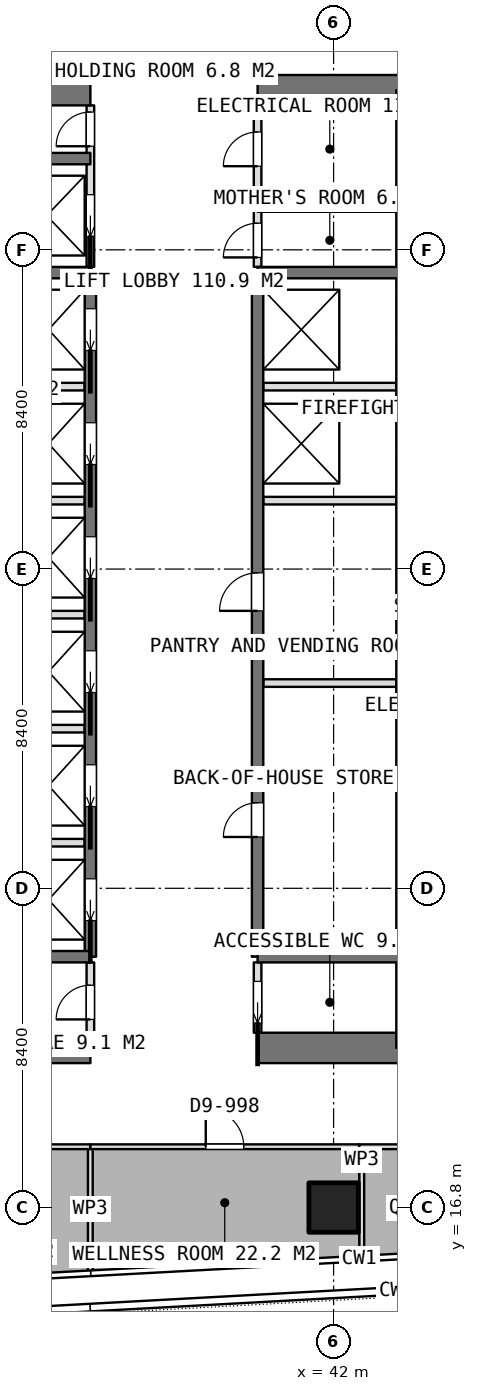
"""IFC4 building model, lengths in metres.
Left out: names, types, materials, properties, quantities, classifications, styles, units other than length and angle.
Written with IfcOpenShell. Run it as: python <this file> out.ifc"""

import sys

from ifc_helpers import new_model, si_unit, direction, frame, frame_2d, origin, origin_2d, place, context, subcontext, project, spatial, rectangle, extrude, element, fill, save


model = new_model("IFC4")
c1 = context("Model", 3, precision=1e-05, world=origin(), true_north=direction((0.0, 1.0)))
c2 = subcontext(c1, "Body", "Model", "MODEL_VIEW")
j1 = project(units=[si_unit("LENGTHUNIT", "METRE"), si_unit("PLANEANGLEUNIT", "RADIAN")], contexts=[c1])
p1 = place(None, origin())
s1 = spatial("IfcSite", under=j1, at=p1, CompositionType="ELEMENT")
p2 = place(p1, origin())
s2 = spatial("IfcBuilding", under=s1, at=p2, CompositionType="ELEMENT")
p3 = place(p2, frame((0.0, 0.0, 268.85)))
s3 = spatial("IfcBuildingStorey", under=s2, at=p3, CompositionType="ELEMENT", Elevation=268.85)
p4 = place(p3, frame((25.2, 21.0, 0.0), z_axis=(0.0, 0.0, 1.0), x_axis=(1.0, 0.0, 0.0)))
e1 = element("IfcWall", 1, at=p4, inside=s3, PredefinedType="SHEAR", context=c2, shape_type="SweptSolid", body=[
    extrude(rectangle(XDim=10.4, YDim=0.8, at=frame_2d((5.2, 0.0))), origin(), (0.0, 0.0, 1.0), 3.75),
])
p5 = place(p3, frame((40.0, 21.0, 0.0), z_axis=(0.0, 0.0, 1.0), x_axis=(1.0, 0.0, 0.0)))
e2 = element("IfcWall", 2, at=p5, inside=s3, PredefinedType="SHEAR", context=c2, shape_type="SweptSolid", body=[
    extrude(rectangle(XDim=10.4, YDim=0.8, at=frame_2d((5.2, 0.0))), origin(), (0.0, 0.0, 1.0), 3.75),
])
p6 = place(p3, frame((25.2, 46.2, 0.0), z_axis=(0.0, 0.0, 1.0), x_axis=(1.0, 0.0, 0.0)))
e3 = element("IfcWall", 3, at=p6, inside=s3, PredefinedType="SHEAR", context=c2, shape_type="SweptSolid", body=[
    extrude(rectangle(XDim=10.4, YDim=0.8, at=frame_2d((5.2, 0.0))), origin(), (0.0, 0.0, 1.0), 3.75),
])
p7 = place(p3, frame((40.0, 46.2, 0.0), z_axis=(0.0, 0.0, 1.0), x_axis=(1.0, 0.0, 0.0)))
e4 = element("IfcWall", 4, at=p7, inside=s3, PredefinedType="SHEAR", context=c2, shape_type="SweptSolid", body=[
    extrude(rectangle(XDim=10.4, YDim=0.8, at=frame_2d((5.2, 0.0))), origin(), (0.0, 0.0, 1.0), 3.75),
])
p8 = place(p3, frame((43.8, 21.0, 0.0), z_axis=(0.0, 0.0, 1.0), x_axis=(0.0, 1.0, 0.0)))
e5 = element("IfcWall", 5, at=p8, inside=s3, PredefinedType="SHEAR", context=c2, shape_type="SweptSolid", body=[
    extrude(rectangle(XDim=25.2, YDim=0.3, at=frame_2d((12.6, 0.0))), origin(), (0.0, 0.0, 1.0), 3.75),
])
p9 = place(p3, frame((35.6, 23.4, 0.0), z_axis=(0.0, 0.0, 1.0), x_axis=(0.0, 1.0, 0.0)))
e6 = element("IfcWall", 6, at=p9, inside=s3, PredefinedType="SHEAR", context=c2, shape_type="SweptSolid", body=[
    extrude(rectangle(XDim=18.0, YDim=0.3, at=frame_2d((9.0, 0.0))), origin(), (0.0, 0.0, 1.0), 3.75),
])
p10 = place(p9, frame((0.95, 0.0, 0.0)))
e7 = element("IfcOpeningElement", 7, at=p10, cuts=e6, PredefinedType="OPENING", context=c2, shape_type="SweptSolid", body=[
    extrude(rectangle(XDim=1.1, YDim=2.1, at=frame_2d((0.55, 1.05))), frame((0.0, 0.16, 0.0), z_axis=(0.0, -1.0, 0.0), x_axis=(1.0, 0.0, 0.0)), (0.0, 0.0, 1.0), 0.32),
])
p11 = place(p9, frame((3.95, 0.0, 0.0)))
e8 = element("IfcOpeningElement", 8, at=p11, cuts=e6, PredefinedType="OPENING", context=c2, shape_type="SweptSolid", body=[
    extrude(rectangle(XDim=1.1, YDim=2.1, at=frame_2d((0.55, 1.05))), frame((0.0, 0.16, 0.0), z_axis=(0.0, -1.0, 0.0), x_axis=(1.0, 0.0, 0.0)), (0.0, 0.0, 1.0), 0.32),
])
p12 = place(p9, frame((6.95, 0.0, 0.0)))
e9 = element("IfcOpeningElement", 9, at=p12, cuts=e6, PredefinedType="OPENING", context=c2, shape_type="SweptSolid", body=[
    extrude(rectangle(XDim=1.1, YDim=2.1, at=frame_2d((0.55, 1.05))), frame((0.0, 0.16, 0.0), z_axis=(0.0, -1.0, 0.0), x_axis=(1.0, 0.0, 0.0)), (0.0, 0.0, 1.0), 0.32),
])
p13 = place(p9, frame((9.95, 0.0, 0.0)))
e10 = element("IfcOpeningElement", 10, at=p13, cuts=e6, PredefinedType="OPENING", context=c2, shape_type="SweptSolid", body=[
    extrude(rectangle(XDim=1.1, YDim=2.1, at=frame_2d((0.55, 1.05))), frame((0.0, 0.16, 0.0), z_axis=(0.0, -1.0, 0.0), x_axis=(1.0, 0.0, 0.0)), (0.0, 0.0, 1.0), 0.32),
])
p14 = place(p9, frame((12.95, 0.0, 0.0)))
e11 = element("IfcOpeningElement", 11, at=p14, cuts=e6, PredefinedType="OPENING", context=c2, shape_type="SweptSolid", body=[
    extrude(rectangle(XDim=1.1, YDim=2.1, at=frame_2d((0.55, 1.05))), frame((0.0, 0.16, 0.0), z_axis=(0.0, -1.0, 0.0), x_axis=(1.0, 0.0, 0.0)), (0.0, 0.0, 1.0), 0.32),
])
p15 = place(p9, frame((15.95, 0.0, 0.0)))
e12 = element("IfcOpeningElement", 12, at=p15, cuts=e6, PredefinedType="OPENING", context=c2, shape_type="SweptSolid", body=[
    extrude(rectangle(XDim=1.1, YDim=2.1, at=frame_2d((0.55, 1.05))), frame((0.0, 0.16, 0.0), z_axis=(0.0, -1.0, 0.0), x_axis=(1.0, 0.0, 0.0)), (0.0, 0.0, 1.0), 0.32),
])
p16 = place(p3, frame((40.0, 23.4, 0.0), z_axis=(0.0, 0.0, 1.0), x_axis=(0.0, 1.0, 0.0)))
e13 = element("IfcWall", 13, at=p16, inside=s3, PredefinedType="SHEAR", context=c2, shape_type="SweptSolid", body=[
    extrude(rectangle(XDim=18.0, YDim=0.3, at=frame_2d((9.0, 0.0))), origin(), (0.0, 0.0, 1.0), 3.75),
])
p17 = place(p16, frame((3.15, 0.0, 0.0)))
e14 = element("IfcOpeningElement", 14, at=p17, cuts=e13, PredefinedType="OPENING", context=c2, shape_type="SweptSolid", body=[
    extrude(rectangle(XDim=0.9, YDim=2.1, at=frame_2d((0.45, 1.05))), frame((0.0, 0.16, 0.0), z_axis=(0.0, -1.0, 0.0), x_axis=(1.0, 0.0, 0.0)), (0.0, 0.0, 1.0), 0.32),
])
p18 = place(p16, frame((9.1, 0.0, 0.0)))
e15 = element("IfcOpeningElement", 15, at=p18, cuts=e13, PredefinedType="OPENING", context=c2, shape_type="SweptSolid", body=[
    extrude(rectangle(XDim=1.0, YDim=2.1, at=frame_2d((0.5, 1.05))), frame((0.0, 0.16, 0.0), z_axis=(0.0, -1.0, 0.0), x_axis=(1.0, 0.0, 0.0)), (0.0, 0.0, 1.0), 0.32),
])
for number, where, z_axis, x_axis in (
    (16, (31.8, 23.4, 0.0), (0.0, 0.0, 1.0), (1.0, 0.0, 0.0)),
    (17, (31.8, 41.4, 0.0), (0.0, 0.0, 1.0), (1.0, 0.0, 0.0)),
    (18, (31.8, 44.4, 0.0), (0.0, 0.0, 1.0), (1.0, 0.0, 0.0)),
    (19, (40.0, 23.4, 0.0), (0.0, 0.0, 1.0), (1.0, 0.0, 0.0)),
    (20, (40.0, 41.4, 0.0), (0.0, 0.0, 1.0), (1.0, 0.0, 0.0)),
):
    element("IfcWall", number, at=place(p3, frame(where, z_axis=z_axis, x_axis=x_axis)), inside=s3, PredefinedType="SHEAR", context=c2, shape_type="SweptSolid", body=[
        extrude(rectangle(XDim=3.8, YDim=0.3, at=frame_2d((1.9, 0.0))), origin(), (0.0, 0.0, 1.0), 3.75),
    ])
p19 = place(p3, frame((42.0, 16.8, 0.0), z_axis=(0.0, 0.0, 1.0), x_axis=(1.0, 0.0, 0.0)))
e21 = element("IfcColumn", 21, at=p19, inside=s3, PredefinedType="COLUMN", context=c2, shape_type="SweptSolid", body=[
    extrude(rectangle(XDim=1.3, YDim=1.3, at=origin_2d()), origin(), (0.0, 0.0, 1.0), 3.75),
])
for number, where, z_axis, x_axis in (
    (22, (31.95, 26.4, 0.0), (0.0, 0.0, 1.0), (1.0, 0.0, 0.0)),
    (23, (31.95, 29.4, 0.0), (0.0, 0.0, 1.0), (1.0, 0.0, 0.0)),
    (24, (31.95, 32.4, 0.0), (0.0, 0.0, 1.0), (1.0, 0.0, 0.0)),
    (25, (31.95, 35.4, 0.0), (0.0, 0.0, 1.0), (1.0, 0.0, 0.0)),
    (26, (31.95, 38.4, 0.0), (0.0, 0.0, 1.0), (1.0, 0.0, 0.0)),
    (27, (40.15, 35.4, 0.0), (0.0, 0.0, 1.0), (1.0, 0.0, 0.0)),
    (28, (40.15, 38.4, 0.0), (0.0, 0.0, 1.0), (1.0, 0.0, 0.0)),
):
    element("IfcWall", number, at=place(p3, frame(where, z_axis=z_axis, x_axis=x_axis)), inside=s3, PredefinedType="PARTITIONING", context=c2, shape_type="SweptSolid", body=[
        extrude(rectangle(XDim=3.5, YDim=0.2, at=frame_2d((1.75, 0.0))), origin(), (0.0, 0.0, 1.0), 3.5),
    ])
p20 = place(p3, frame((40.0, 21.4, 0.0), z_axis=(0.0, 0.0, 1.0), x_axis=(0.0, 1.0, 0.0)))
e29 = element("IfcWall", 29, at=p20, inside=s3, PredefinedType="PARTITIONING", context=c2, shape_type="SweptSolid", body=[
    extrude(rectangle(XDim=1.85, YDim=0.2, at=frame_2d((0.925, 0.0))), origin(), (0.0, 0.0, 1.0), 3.5),
])
p21 = place(p20, frame((0.25, 0.0, 0.0)))
e30 = element("IfcOpeningElement", 30, at=p21, cuts=e29, PredefinedType="OPENING", context=c2, shape_type="SweptSolid", body=[
    extrude(rectangle(XDim=1.1, YDim=2.1, at=frame_2d((0.55, 1.05))), frame((0.0, 0.11, 0.0), z_axis=(0.0, -1.0, 0.0), x_axis=(1.0, 0.0, 0.0)), (0.0, 0.0, 1.0), 0.22),
])
p22 = place(p3, frame((40.0, 41.55, 0.0), z_axis=(0.0, 0.0, 1.0), x_axis=(0.0, 1.0, 0.0)))
e31 = element("IfcWall", 31, at=p22, inside=s3, PredefinedType="PARTITIONING", context=c2, shape_type="SweptSolid", body=[
    extrude(rectangle(XDim=4.25, YDim=0.2, at=frame_2d((2.125, 0.0))), origin(), (0.0, 0.0, 1.0), 3.5),
])
p23 = place(p22, frame((2.65, 0.0, 0.0)))
e32 = element("IfcOpeningElement", 32, at=p23, cuts=e31, PredefinedType="OPENING", context=c2, shape_type="SweptSolid", body=[
    extrude(rectangle(XDim=0.9, YDim=2.1, at=frame_2d((0.45, 1.05))), frame((0.0, 0.11, 0.0), z_axis=(0.0, -1.0, 0.0), x_axis=(1.0, 0.0, 0.0)), (0.0, 0.0, 1.0), 0.22),
])
p24 = place(p22, frame((0.25, 0.0, 0.0)))
e33 = element("IfcOpeningElement", 33, at=p24, cuts=e31, PredefinedType="OPENING", context=c2, shape_type="SweptSolid", body=[
    extrude(rectangle(XDim=0.9, YDim=2.1, at=frame_2d((0.45, 1.05))), frame((0.0, 0.11, 0.0), z_axis=(0.0, -1.0, 0.0), x_axis=(1.0, 0.0, 0.0)), (0.0, 0.0, 1.0), 0.22),
])
p25 = place(p3, frame((35.6, 41.55, 0.0), z_axis=(0.0, 0.0, 1.0), x_axis=(0.0, 1.0, 0.0)))
e34 = element("IfcWall", 34, at=p25, inside=s3, PredefinedType="PARTITIONING", context=c2, shape_type="SweptSolid", body=[
    extrude(rectangle(XDim=4.25, YDim=0.2, at=frame_2d((2.125, 0.0))), origin(), (0.0, 0.0, 1.0), 3.5),
])
p26 = place(p25, frame((3.175, 0.0, 0.0)))
e35 = element("IfcOpeningElement", 35, at=p26, cuts=e34, PredefinedType="OPENING", context=c2, shape_type="SweptSolid", body=[
    extrude(rectangle(XDim=0.9, YDim=2.1, at=frame_2d((0.45, 1.05))), frame((0.0, 0.11, 0.0), z_axis=(0.0, -1.0, 0.0), x_axis=(1.0, 0.0, 0.0)), (0.0, 0.0, 1.0), 0.22),
])
p27 = place(p25, frame((0.8, 0.0, 0.0)))
e36 = element("IfcOpeningElement", 36, at=p27, cuts=e34, PredefinedType="OPENING", context=c2, shape_type="SweptSolid", body=[
    extrude(rectangle(XDim=1.1, YDim=2.1, at=frame_2d((0.55, 1.05))), frame((0.0, 0.11, 0.0), z_axis=(0.0, -1.0, 0.0), x_axis=(1.0, 0.0, 0.0)), (0.0, 0.0, 1.0), 0.22),
])
p28 = place(p3, frame((35.6, 21.4, 0.0), z_axis=(0.0, 0.0, 1.0), x_axis=(0.0, 1.0, 0.0)))
e37 = element("IfcWall", 37, at=p28, inside=s3, PredefinedType="PARTITIONING", context=c2, shape_type="SweptSolid", body=[
    extrude(rectangle(XDim=1.85, YDim=0.2, at=frame_2d((0.925, 0.0))), origin(), (0.0, 0.0, 1.0), 3.5),
])
p29 = place(p28, frame((0.35, 0.0, 0.0)))
e38 = element("IfcOpeningElement", 38, at=p29, cuts=e37, PredefinedType="OPENING", context=c2, shape_type="SweptSolid", body=[
    extrude(rectangle(XDim=0.9, YDim=2.1, at=frame_2d((0.45, 1.05))), frame((0.0, 0.11, 0.0), z_axis=(0.0, -1.0, 0.0), x_axis=(1.0, 0.0, 0.0)), (0.0, 0.0, 1.0), 0.22),
])
p30 = place(p3, frame((40.15, 30.6, 0.0), z_axis=(0.0, 0.0, 1.0), x_axis=(1.0, 0.0, 0.0)))
e39 = element("IfcWall", 39, at=p30, inside=s3, PredefinedType="PARTITIONING", context=c2, shape_type="SweptSolid", body=[
    extrude(rectangle(XDim=3.5, YDim=0.2, at=frame_2d((1.75, 0.0))), origin(), (0.0, 0.0, 1.0), 3.5),
])
p31 = place(p3, frame((40.0, 43.1, 0.0), z_axis=(0.0, 0.0, 1.0), x_axis=(1.0, 0.0, 0.0)))
e40 = element("IfcWall", 40, at=p31, inside=s3, PredefinedType="PARTITIONING", context=c2, shape_type="SweptSolid", body=[
    extrude(rectangle(XDim=3.65, YDim=0.2, at=frame_2d((1.825, 0.0))), origin(), (0.0, 0.0, 1.0), 3.5),
])
p32 = place(p3, frame((35.599, 15.119, 0.0), z_axis=(0.0, 0.0, 1.0), x_axis=(0.0, 1.0, 0.0)))
e41 = element("IfcWall", 41, at=p32, inside=s3, PredefinedType="PARTITIONING", context=c2, shape_type="SweptSolid", body=[
    extrude(rectangle(XDim=3.281, YDim=0.125, at=frame_2d((1.641, 0.0))), origin(), (0.0, 0.0, 1.0), 3.5),
])
p33 = place(p3, frame((35.599, 18.4, 0.0), z_axis=(0.0, 0.0, 1.0), x_axis=(1.0, 0.0, 0.0)))
e42 = element("IfcWall", 42, at=p33, inside=s3, PredefinedType="PARTITIONING", context=c2, shape_type="SweptSolid", body=[
    extrude(rectangle(XDim=7.074, YDim=0.125, at=frame_2d((3.537, 0.0))), origin(), (0.0, 0.0, 1.0), 3.5),
])
p34 = place(p33, frame((3.037, 0.0, 0.0)))
e43 = element("IfcOpeningElement", 43, at=p34, cuts=e42, PredefinedType="OPENING", context=c2, shape_type="SweptSolid", body=[
    extrude(rectangle(XDim=1.0, YDim=2.1, at=frame_2d((0.5, 1.05))), frame((0.0, 0.073, 0.0), z_axis=(0.0, -1.0, 0.0), x_axis=(1.0, 0.0, 0.0)), (0.0, 0.0, 1.0), 0.145),
])
p35 = place(p3, frame((42.742, 18.337, 0.0), z_axis=(0.0, 0.0, 1.0), x_axis=(0.0, -1.0, 0.0)))
e44 = element("IfcWall", 44, at=p35, inside=s3, PredefinedType="PARTITIONING", context=c2, shape_type="SweptSolid", body=[
    extrude(rectangle(XDim=2.799, YDim=0.125, at=frame_2d((1.399, 0.0))), origin(), (0.0, 0.0, 1.0), 3.5),
])
p36 = place(p3, frame((42.674, 18.4, 0.0), z_axis=(0.0, 0.0, 1.0), x_axis=(1.0, 0.0, 0.0)))
e45 = element("IfcWall", 45, at=p36, inside=s3, PredefinedType="PARTITIONING", context=c2, shape_type="SweptSolid", body=[
    extrude(rectangle(XDim=7.726, YDim=0.125, at=frame_2d((3.863, 0.0))), origin(), (0.0, 0.0, 1.0), 3.5),
])
p37 = place(p36, frame((3.363, 0.0, 0.0)))
e46 = element("IfcOpeningElement", 46, at=p37, cuts=e45, PredefinedType="OPENING", context=c2, shape_type="SweptSolid", body=[
    extrude(rectangle(XDim=1.0, YDim=2.1, at=frame_2d((0.5, 1.05))), frame((0.0, 0.073, 0.0), z_axis=(0.0, -1.0, 0.0), x_axis=(1.0, 0.0, 0.0)), (0.0, 0.0, 1.0), 0.145),
])
p38 = place(p3, frame((27.255, 18.4, 0.0), z_axis=(0.0, 0.0, 1.0), x_axis=(1.0, 0.0, 0.0)))
e47 = element("IfcWall", 47, at=p38, inside=s3, PredefinedType="PARTITIONING", context=c2, shape_type="SweptSolid", body=[
    extrude(rectangle(XDim=8.343, YDim=0.125, at=frame_2d((4.171, 0.0))), origin(), (0.0, 0.0, 1.0), 3.5),
])
p39 = place(p38, frame((3.671, 0.0, 0.0)))
e48 = element("IfcOpeningElement", 48, at=p39, cuts=e47, PredefinedType="OPENING", context=c2, shape_type="SweptSolid", body=[
    extrude(rectangle(XDim=1.0, YDim=2.1, at=frame_2d((0.5, 1.05))), frame((0.0, 0.073, 0.0), z_axis=(0.0, -1.0, 0.0), x_axis=(1.0, 0.0, 0.0)), (0.0, 0.0, 1.0), 0.145),
])
p40 = place(p21, origin())
e49 = element("IfcDoor", 49, at=p40, inside=s3, OperationType="SLIDING_TO_LEFT", PredefinedType="DOOR", context=c2, shape_type="SweptSolid", body=[
    extrude(rectangle(XDim=1.1, YDim=2.1, at=frame_2d((0.55, 1.05))), frame((0.0, 0.025, 0.0), z_axis=(0.0, -1.0, 0.0), x_axis=(1.0, 0.0, 0.0)), (0.0, 0.0, 1.0), 0.05),
])
fill(e30, e49)
p41 = place(p29, origin())
e50 = element("IfcDoor", 50, at=p41, inside=s3, OperationType="SINGLE_SWING_LEFT", PredefinedType="DOOR", context=c2, shape_type="SweptSolid", body=[
    extrude(rectangle(XDim=0.9, YDim=2.1, at=frame_2d((0.45, 1.05))), frame((0.0, 0.025, 0.0), z_axis=(0.0, -1.0, 0.0), x_axis=(1.0, 0.0, 0.0)), (0.0, 0.0, 1.0), 0.05),
])
fill(e38, e50)
p42 = place(p23, origin())
e51 = element("IfcDoor", 51, at=p42, inside=s3, OperationType="SINGLE_SWING_LEFT", PredefinedType="DOOR", context=c2, shape_type="SweptSolid", body=[
    extrude(rectangle(XDim=0.9, YDim=2.1, at=frame_2d((0.45, 1.05))), frame((0.0, 0.025, 0.0), z_axis=(0.0, -1.0, 0.0), x_axis=(1.0, 0.0, 0.0)), (0.0, 0.0, 1.0), 0.05),
])
fill(e32, e51)
p43 = place(p24, origin())
e52 = element("IfcDoor", 52, at=p43, inside=s3, OperationType="SINGLE_SWING_LEFT", PredefinedType="DOOR", context=c2, shape_type="SweptSolid", body=[
    extrude(rectangle(XDim=0.9, YDim=2.1, at=frame_2d((0.45, 1.05))), frame((0.0, 0.025, 0.0), z_axis=(0.0, -1.0, 0.0), x_axis=(1.0, 0.0, 0.0)), (0.0, 0.0, 1.0), 0.05),
])
fill(e33, e52)
p44 = place(p17, origin())
e53 = element("IfcDoor", 53, at=p44, inside=s3, OperationType="SINGLE_SWING_LEFT", PredefinedType="DOOR", context=c2, shape_type="SweptSolid", body=[
    extrude(rectangle(XDim=0.9, YDim=2.1, at=frame_2d((0.45, 1.05))), frame((0.0, 0.025, 0.0), z_axis=(0.0, -1.0, 0.0), x_axis=(1.0, 0.0, 0.0)), (0.0, 0.0, 1.0), 0.05),
])
fill(e14, e53)
p45 = place(p18, origin())
e54 = element("IfcDoor", 54, at=p45, inside=s3, OperationType="SINGLE_SWING_LEFT", PredefinedType="DOOR", context=c2, shape_type="SweptSolid", body=[
    extrude(rectangle(XDim=1.0, YDim=2.1, at=frame_2d((0.5, 1.05))), frame((0.0, 0.025, 0.0), z_axis=(0.0, -1.0, 0.0), x_axis=(1.0, 0.0, 0.0)), (0.0, 0.0, 1.0), 0.05),
])
fill(e15, e54)
p46 = place(p26, origin())
e55 = element("IfcDoor", 55, at=p46, inside=s3, OperationType="SINGLE_SWING_LEFT", PredefinedType="DOOR", context=c2, shape_type="SweptSolid", body=[
    extrude(rectangle(XDim=0.9, YDim=2.1, at=frame_2d((0.45, 1.05))), frame((0.0, 0.025, 0.0), z_axis=(0.0, -1.0, 0.0), x_axis=(1.0, 0.0, 0.0)), (0.0, 0.0, 1.0), 0.05),
])
fill(e35, e55)
p47 = place(p10, origin())
e56 = element("IfcDoor", 56, at=p47, inside=s3, OperationType="SLIDING_TO_LEFT", PredefinedType="USERDEFINED", context=c2, shape_type="SweptSolid", body=[
    extrude(rectangle(XDim=1.1, YDim=2.1, at=frame_2d((0.55, 1.05))), frame((0.0, 0.025, 0.0), z_axis=(0.0, -1.0, 0.0), x_axis=(1.0, 0.0, 0.0)), (0.0, 0.0, 1.0), 0.05),
])
fill(e7, e56)
p48 = place(p11, origin())
e57 = element("IfcDoor", 57, at=p48, inside=s3, OperationType="SLIDING_TO_LEFT", PredefinedType="USERDEFINED", context=c2, shape_type="SweptSolid", body=[
    extrude(rectangle(XDim=1.1, YDim=2.1, at=frame_2d((0.55, 1.05))), frame((0.0, 0.025, 0.0), z_axis=(0.0, -1.0, 0.0), x_axis=(1.0, 0.0, 0.0)), (0.0, 0.0, 1.0), 0.05),
])
fill(e8, e57)
p49 = place(p12, origin())
e58 = element("IfcDoor", 58, at=p49, inside=s3, OperationType="SLIDING_TO_LEFT", PredefinedType="USERDEFINED", context=c2, shape_type="SweptSolid", body=[
    extrude(rectangle(XDim=1.1, YDim=2.1, at=frame_2d((0.55, 1.05))), frame((0.0, 0.025, 0.0), z_axis=(0.0, -1.0, 0.0), x_axis=(1.0, 0.0, 0.0)), (0.0, 0.0, 1.0), 0.05),
])
fill(e9, e58)
p50 = place(p13, origin())
e59 = element("IfcDoor", 59, at=p50, inside=s3, OperationType="SLIDING_TO_LEFT", PredefinedType="USERDEFINED", context=c2, shape_type="SweptSolid", body=[
    extrude(rectangle(XDim=1.1, YDim=2.1, at=frame_2d((0.55, 1.05))), frame((0.0, 0.025, 0.0), z_axis=(0.0, -1.0, 0.0), x_axis=(1.0, 0.0, 0.0)), (0.0, 0.0, 1.0), 0.05),
])
fill(e10, e59)
p51 = place(p14, origin())
e60 = element("IfcDoor", 60, at=p51, inside=s3, OperationType="SLIDING_TO_LEFT", PredefinedType="USERDEFINED", context=c2, shape_type="SweptSolid", body=[
    extrude(rectangle(XDim=1.1, YDim=2.1, at=frame_2d((0.55, 1.05))), frame((0.0, 0.025, 0.0), z_axis=(0.0, -1.0, 0.0), x_axis=(1.0, 0.0, 0.0)), (0.0, 0.0, 1.0), 0.05),
])
fill(e11, e60)
p52 = place(p15, origin())
e61 = element("IfcDoor", 61, at=p52, inside=s3, OperationType="SLIDING_TO_LEFT", PredefinedType="USERDEFINED", context=c2, shape_type="SweptSolid", body=[
    extrude(rectangle(XDim=1.1, YDim=2.1, at=frame_2d((0.55, 1.05))), frame((0.0, 0.025, 0.0), z_axis=(0.0, -1.0, 0.0), x_axis=(1.0, 0.0, 0.0)), (0.0, 0.0, 1.0), 0.05),
])
fill(e12, e61)
p53 = place(p27, origin())
e62 = element("IfcDoor", 62, at=p53, inside=s3, OperationType="SLIDING_TO_LEFT", PredefinedType="USERDEFINED", context=c2, shape_type="SweptSolid", body=[
    extrude(rectangle(XDim=1.1, YDim=2.1, at=frame_2d((0.55, 1.05))), frame((0.0, 0.025, 0.0), z_axis=(0.0, -1.0, 0.0), x_axis=(1.0, 0.0, 0.0)), (0.0, 0.0, 1.0), 0.05),
])
fill(e36, e62)
p54 = place(p34, origin())
e63 = element("IfcDoor", 63, at=p54, inside=s3, OperationType="SINGLE_SWING_LEFT", PredefinedType="DOOR", context=c2, shape_type="SweptSolid", body=[
    extrude(rectangle(XDim=1.0, YDim=2.1, at=frame_2d((0.5, 1.05))), frame((0.0, 0.025, 0.0), z_axis=(0.0, -1.0, 0.0), x_axis=(1.0, 0.0, 0.0)), (0.0, 0.0, 1.0), 0.05),
])
fill(e43, e63)
save(model, sys.argv[1])
